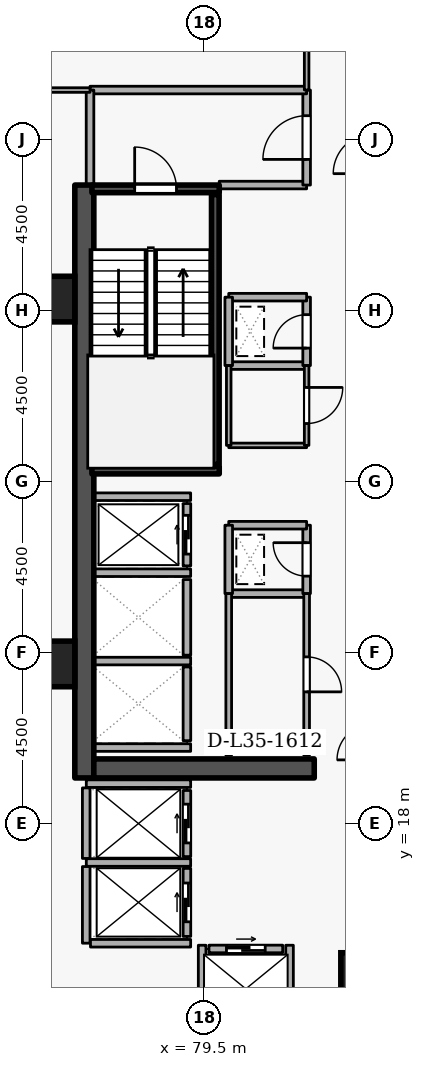
"""IFC4 building model, lengths in metres.
Left out: names, types, materials, properties, quantities, classifications, styles, units other than length and angle.
Written with IfcOpenShell. Run it as: python <this file> out.ifc"""

import sys

from ifc_helpers import new_model, si_unit, direction, frame, frame_2d, origin, origin_2d, place, context, subcontext, project, spatial, rectangle, extrude, element, fill, save


model = new_model("IFC4")
c1 = context("Model", 3, precision=1e-05, world=origin(), true_north=direction((0.0, 1.0)))
c2 = subcontext(c1, "Body", "Model", "MODEL_VIEW")
j1 = project(units=[si_unit("LENGTHUNIT", "METRE"), si_unit("PLANEANGLEUNIT", "RADIAN")], contexts=[c1])
p1 = place(None, origin())
s1 = spatial("IfcSite", under=j1, at=p1, CompositionType="ELEMENT")
p2 = place(p1, origin())
s2 = spatial("IfcBuilding", under=s1, at=p2, CompositionType="ELEMENT")
p3 = place(p2, frame((0.0, 0.0, 134.1)))
s3 = spatial("IfcBuildingStorey", under=s2, at=p3, CompositionType="ELEMENT", Elevation=134.1)
p4 = place(p3, frame((76.35, 19.2, 0.0), z_axis=(0.0, 0.0, 1.0), x_axis=(0.0, 1.0, 0.0)))
e1 = element("IfcWall", 1, at=p4, inside=s3, PredefinedType="SHEAR", context=c2, shape_type="SweptSolid", body=[
    extrude(rectangle(XDim=15.6, YDim=0.5, at=frame_2d((7.8, 0.0))), origin(), (0.0, 0.0, 1.0), 3.6),
])
p5 = place(p3, frame((76.6, 19.45, 0.0), z_axis=(0.0, 0.0, 1.0), x_axis=(1.0, 0.0, 0.0)))
e2 = element("IfcWall", 2, at=p5, inside=s3, PredefinedType="SHEAR", context=c2, shape_type="SweptSolid", body=[
    extrude(rectangle(XDim=5.8, YDim=0.5, at=frame_2d((2.9, 0.0))), origin(), (0.0, 0.0, 1.0), 3.6),
])
for number, where, z_axis, x_axis in (
    (3, (83.7, 14.0, 0.0), (0.0, 0.0, 1.0), (1.0, 0.0, 0.0)),
    (4, (75.5, 22.2, 0.0), (0.0, 0.0, 1.0), (1.0, 0.0, 0.0)),
    (5, (75.5, 31.8, 0.0), (0.0, 0.0, 1.0), (1.0, 0.0, 0.0)),
):
    element("IfcColumn", number, at=place(p3, frame(where, z_axis=z_axis, x_axis=x_axis)), inside=s3, PredefinedType="COLUMN", context=c2, shape_type="SweptSolid", body=[
        extrude(rectangle(XDim=1.2, YDim=1.2, at=origin_2d()), origin(), (0.0, 0.0, 1.0), 3.6),
    ])
p6 = place(p3, frame((79.05, 24.78, 0.0), z_axis=(0.0, 0.0, 1.0), x_axis=(0.0, 1.0, 0.0)))
e6 = element("IfcWall", 6, at=p6, inside=s3, PredefinedType="STANDARD", context=c2, shape_type="SweptSolid", body=[
    extrude(rectangle(XDim=1.64, YDim=0.2, at=frame_2d((0.82, 0.0))), origin(), (0.0, 0.0, 1.0), 3.34),
])
p7 = place(p6, frame((0.31, 0.0, 0.0)))
e7 = element("IfcOpeningElement", 7, at=p7, cuts=e6, PredefinedType="OPENING", context=c2, shape_type="SweptSolid", body=[
    extrude(rectangle(XDim=1.02, YDim=2.06, at=frame_2d((0.51, 1.03))), frame((0.0, 0.11, 0.0), z_axis=(0.0, -1.0, 0.0), x_axis=(1.0, 0.0, 0.0)), (0.0, 0.0, 1.0), 0.22),
])
p8 = place(p3, frame((79.05, 22.43, 0.0), z_axis=(0.0, 0.0, 1.0), x_axis=(0.0, 1.0, 0.0)))
e8 = element("IfcWall", 8, at=p8, inside=s3, PredefinedType="STANDARD", context=c2, shape_type="SweptSolid", body=[
    extrude(rectangle(XDim=1.99, YDim=0.2, at=frame_2d((0.995, 0.0))), origin(), (0.0, 0.0, 1.0), 3.34),
])
p9 = place(p3, frame((79.05, 20.18, 0.0), z_axis=(0.0, 0.0, 1.0), x_axis=(0.0, 1.0, 0.0)))
e9 = element("IfcWall", 9, at=p9, inside=s3, PredefinedType="STANDARD", context=c2, shape_type="SweptSolid", body=[
    extrude(rectangle(XDim=1.94, YDim=0.2, at=frame_2d((0.97, 0.0))), origin(), (0.0, 0.0, 1.0), 3.34),
])
p10 = place(p3, frame((79.05, 17.13, 0.0), z_axis=(0.0, 0.0, 1.0), x_axis=(0.0, 1.0, 0.0)))
e10 = element("IfcWall", 10, at=p10, inside=s3, PredefinedType="STANDARD", context=c2, shape_type="SweptSolid", body=[
    extrude(rectangle(XDim=1.74, YDim=0.2, at=frame_2d((0.87, 0.0))), origin(), (0.0, 0.0, 1.0), 3.34),
])
p11 = place(p10, frame((0.36, 0.0, 0.0)))
e11 = element("IfcOpeningElement", 11, at=p11, cuts=e10, PredefinedType="OPENING", context=c2, shape_type="SweptSolid", body=[
    extrude(rectangle(XDim=1.02, YDim=2.06, at=frame_2d((0.51, 1.03))), frame((0.0, 0.11, 0.0), z_axis=(0.0, -1.0, 0.0), x_axis=(1.0, 0.0, 0.0)), (0.0, 0.0, 1.0), 0.22),
])
p12 = place(p3, frame((79.05, 15.03, 0.0), z_axis=(0.0, 0.0, 1.0), x_axis=(0.0, 1.0, 0.0)))
e12 = element("IfcWall", 12, at=p12, inside=s3, PredefinedType="STANDARD", context=c2, shape_type="SweptSolid", body=[
    extrude(rectangle(XDim=1.79, YDim=0.2, at=frame_2d((0.895, 0.0))), origin(), (0.0, 0.0, 1.0), 3.34),
])
p13 = place(p12, frame((0.385, 0.0, 0.0)))
e13 = element("IfcOpeningElement", 13, at=p13, cuts=e12, PredefinedType="OPENING", context=c2, shape_type="SweptSolid", body=[
    extrude(rectangle(XDim=1.02, YDim=2.06, at=frame_2d((0.51, 1.03))), frame((0.0, 0.11, 0.0), z_axis=(0.0, -1.0, 0.0), x_axis=(1.0, 0.0, 0.0)), (0.0, 0.0, 1.0), 0.22),
])
p14 = place(p3, frame((79.63, 14.7, 0.0), z_axis=(0.0, 0.0, 1.0), x_axis=(1.0, 0.0, 0.0)))
e14 = element("IfcWall", 14, at=p14, inside=s3, PredefinedType="STANDARD", context=c2, shape_type="SweptSolid", body=[
    extrude(rectangle(XDim=1.94, YDim=0.2, at=frame_2d((0.97, 0.0))), origin(), (0.0, 0.0, 1.0), 3.34),
])
p15 = place(p14, frame((0.46, 0.0, 0.0)))
e15 = element("IfcOpeningElement", 15, at=p15, cuts=e14, PredefinedType="OPENING", context=c2, shape_type="SweptSolid", body=[
    extrude(rectangle(XDim=1.02, YDim=2.06, at=frame_2d((0.51, 1.03))), frame((0.0, 0.11, 0.0), z_axis=(0.0, -1.0, 0.0), x_axis=(1.0, 0.0, 0.0)), (0.0, 0.0, 1.0), 0.22),
])
for number, where, z_axis, x_axis in (
    (16, (76.612, 26.6, 0.0), (0.0, 0.0, 1.0), (1.0, 0.0, 0.0)),
    (17, (76.612, 24.6, 0.0), (0.0, 0.0, 1.0), (1.0, 0.0, 0.0)),
    (18, (76.612, 22.275, 0.0), (0.0, 0.0, 1.0), (1.0, 0.0, 0.0)),
    (19, (76.612, 20.0, 0.0), (0.0, 0.0, 1.0), (1.0, 0.0, 0.0)),
):
    element("IfcWall", number, at=place(p3, frame(where, z_axis=z_axis, x_axis=x_axis)), inside=s3, PredefinedType="STANDARD", context=c2, shape_type="SweptSolid", body=[
        extrude(rectangle(XDim=2.536, YDim=0.2, at=frame_2d((1.268, 0.0))), origin(), (0.0, 0.0, 1.0), 3.34),
    ])
p16 = place(p3, frame((76.402, 19.05, 0.0), z_axis=(0.0, 0.0, 1.0), x_axis=(1.0, 0.0, 0.0)))
e20 = element("IfcWall", 20, at=p16, inside=s3, PredefinedType="STANDARD", context=c2, shape_type="SweptSolid", body=[
    extrude(rectangle(XDim=2.746, YDim=0.2, at=frame_2d((1.373, 0.0))), origin(), (0.0, 0.0, 1.0), 2.545),
])
p17 = place(p3, frame((76.402, 16.975, 0.0), z_axis=(0.0, 0.0, 1.0), x_axis=(1.0, 0.0, 0.0)))
e21 = element("IfcWall", 21, at=p17, inside=s3, PredefinedType="STANDARD", context=c2, shape_type="SweptSolid", body=[
    extrude(rectangle(XDim=2.746, YDim=0.2, at=frame_2d((1.373, 0.0))), origin(), (0.0, 0.0, 1.0), 3.34),
])
p18 = place(p3, frame((76.4, 14.852, 0.0), z_axis=(0.0, 0.0, 1.0), x_axis=(0.0, 1.0, 0.0)))
e22 = element("IfcWall", 22, at=p18, inside=s3, PredefinedType="STANDARD", context=c2, shape_type="SweptSolid", body=[
    extrude(rectangle(XDim=2.016, YDim=0.2, at=frame_2d((1.008, 0.0))), origin(), (0.0, 0.0, 1.0), 3.34),
])
p19 = place(p3, frame((76.4, 17.082, 0.0), z_axis=(0.0, 0.0, 1.0), x_axis=(0.0, 1.0, 0.0)))
e23 = element("IfcWall", 23, at=p19, inside=s3, PredefinedType="STANDARD", context=c2, shape_type="SweptSolid", body=[
    extrude(rectangle(XDim=1.856, YDim=0.2, at=frame_2d((0.928, 0.0))), origin(), (0.0, 0.0, 1.0), 3.34),
])
p20 = place(p3, frame((76.512, 14.85, 0.0), z_axis=(0.0, 0.0, 1.0), x_axis=(1.0, 0.0, 0.0)))
e24 = element("IfcWall", 24, at=p20, inside=s3, PredefinedType="STANDARD", context=c2, shape_type="SweptSolid", body=[
    extrude(rectangle(XDim=2.636, YDim=0.2, at=frame_2d((1.318, 0.0))), origin(), (0.0, 0.0, 1.0), 3.34),
])
for number, where, z_axis, x_axis in (
    (25, (81.75, 12.612, 0.0), (0.0, 0.0, 1.0), (0.0, 1.0, 0.0)),
    (26, (79.45, 12.612, 0.0), (0.0, 0.0, 1.0), (0.0, 1.0, 0.0)),
):
    element("IfcWall", number, at=place(p3, frame(where, z_axis=z_axis, x_axis=x_axis)), inside=s3, PredefinedType="STANDARD", context=c2, shape_type="SweptSolid", body=[
        extrude(rectangle(XDim=2.186, YDim=0.2, at=frame_2d((1.093, 0.0))), origin(), (0.0, 0.0, 1.0), 3.34),
    ])
p21 = place(p3, frame((76.55, 34.7, 0.0), z_axis=(0.0, 0.0, 1.0), x_axis=(1.0, 0.0, 0.0)))
e27 = element("IfcWall", 27, at=p21, inside=s3, PredefinedType="SHEAR", context=c2, shape_type="SweptSolid", body=[
    extrude(rectangle(XDim=3.35, YDim=0.2, at=frame_2d((1.675, 0.0))), origin(), (0.0, 0.0, 1.0), 3.6),
])
p22 = place(p21, frame((1.125, 0.0, 0.0)))
e28 = element("IfcOpeningElement", 28, at=p22, cuts=e27, PredefinedType="OPENING", context=c2, shape_type="SweptSolid", body=[
    extrude(rectangle(XDim=1.1, YDim=2.1, at=frame_2d((0.55, 1.05))), frame((0.0, 0.11, 0.0), z_axis=(0.0, -1.0, 0.0), x_axis=(1.0, 0.0, 0.0)), (0.0, 0.0, 1.0), 0.22),
])
p23 = place(p3, frame((79.9, 27.3, 0.0), z_axis=(0.0, 0.0, 1.0), x_axis=(-1.0, 0.0, 0.0)))
e29 = element("IfcWall", 29, at=p23, inside=s3, PredefinedType="SHEAR", context=c2, shape_type="SweptSolid", body=[
    extrude(rectangle(XDim=3.35, YDim=0.2, at=frame_2d((1.675, 0.0))), origin(), (0.0, 0.0, 1.0), 3.6),
])
p24 = place(p3, frame((79.797, 27.45, 0.0), z_axis=(0.0, 0.0, 1.0), x_axis=(0.0, 1.0, 0.0)))
e30 = element("IfcWall", 30, at=p24, inside=s3, PredefinedType="SHEAR", context=c2, shape_type="SweptSolid", body=[
    extrude(rectangle(XDim=7.1, YDim=0.2, at=frame_2d((3.55, 0.0))), origin(), (0.0, 0.0, 1.0), 3.6),
])
p25 = place(p3, frame((79.9, 34.8, 0.0), z_axis=(0.0, 0.0, 1.0), x_axis=(1.0, 0.0, 0.0)))
e31 = element("IfcWall", 31, at=p25, inside=s3, PredefinedType="STANDARD", context=c2, shape_type="SweptSolid", body=[
    extrude(rectangle(XDim=2.3, YDim=0.2, at=frame_2d((1.15, 0.0))), origin(), (0.0, 0.0, 1.0), 2.545),
])
p26 = place(p3, frame((82.2, 34.8, 0.0), z_axis=(0.0, 0.0, 1.0), x_axis=(0.0, 1.0, 0.0)))
e32 = element("IfcWall", 32, at=p26, inside=s3, PredefinedType="STANDARD", context=c2, shape_type="SweptSolid", body=[
    extrude(rectangle(XDim=2.5, YDim=0.2, at=frame_2d((1.25, 0.0))), origin(), (0.0, 0.0, 1.0), 3.34),
])
p27 = place(p26, frame((0.675, 0.0, 0.0)))
e33 = element("IfcOpeningElement", 33, at=p27, cuts=e32, PredefinedType="OPENING", context=c2, shape_type="SweptSolid", body=[
    extrude(rectangle(XDim=1.15, YDim=2.1, at=frame_2d((0.575, 1.05))), frame((0.0, 0.11, 0.0), z_axis=(0.0, -1.0, 0.0), x_axis=(1.0, 0.0, 0.0)), (0.0, 0.0, 1.0), 0.22),
])
p28 = place(p3, frame((82.2, 37.3, 0.0), z_axis=(0.0, 0.0, 1.0), x_axis=(-1.0, 0.0, 0.0)))
e34 = element("IfcWall", 34, at=p28, inside=s3, PredefinedType="STANDARD", context=c2, shape_type="SweptSolid", body=[
    extrude(rectangle(XDim=5.7, YDim=0.2, at=frame_2d((2.85, 0.0))), origin(), (0.0, 0.0, 1.0), 3.34),
])
p29 = place(p3, frame((76.5, 37.3, 0.0), z_axis=(0.0, 0.0, 1.0), x_axis=(0.0, -1.0, 0.0)))
e35 = element("IfcWall", 35, at=p29, inside=s3, PredefinedType="STANDARD", context=c2, shape_type="SweptSolid", body=[
    extrude(rectangle(XDim=2.5, YDim=0.2, at=frame_2d((1.25, 0.0))), origin(), (0.0, 0.0, 1.0), 3.34),
])
p30 = place(p3, frame((80.15, 24.05, 0.0), z_axis=(0.0, 0.0, 1.0), x_axis=(1.0, 0.0, 0.0)))
e36 = element("IfcWall", 36, at=p30, inside=s3, PredefinedType="STANDARD", context=c2, shape_type="SweptSolid", body=[
    extrude(rectangle(XDim=2.05, YDim=0.2, at=frame_2d((1.025, 0.0))), origin(), (0.0, 0.0, 1.0), 3.34),
])
p31 = place(p3, frame((82.2, 24.05, 0.0), z_axis=(0.0, 0.0, 1.0), x_axis=(0.0, 1.0, 0.0)))
e37 = element("IfcWall", 37, at=p31, inside=s3, PredefinedType="STANDARD", context=c2, shape_type="SweptSolid", body=[
    extrude(rectangle(XDim=1.8, YDim=0.2, at=frame_2d((0.9, 0.0))), origin(), (0.0, 0.0, 1.0), 3.34),
])
p32 = place(p31, frame((0.46, 0.0, 0.0)))
e38 = element("IfcOpeningElement", 38, at=p32, cuts=e37, PredefinedType="OPENING", context=c2, shape_type="SweptSolid", body=[
    extrude(rectangle(XDim=0.88, YDim=2.04, at=frame_2d((0.44, 1.02))), frame((0.0, 0.11, 0.0), z_axis=(0.0, -1.0, 0.0), x_axis=(1.0, 0.0, 0.0)), (0.0, 0.0, 1.0), 0.22),
])
p33 = place(p3, frame((82.2, 25.85, 0.0), z_axis=(0.0, 0.0, 1.0), x_axis=(-1.0, 0.0, 0.0)))
e39 = element("IfcWall", 39, at=p33, inside=s3, PredefinedType="STANDARD", context=c2, shape_type="SweptSolid", body=[
    extrude(rectangle(XDim=2.05, YDim=0.2, at=frame_2d((1.025, 0.0))), origin(), (0.0, 0.0, 1.0), 3.34),
])
p34 = place(p3, frame((80.15, 25.85, 0.0), z_axis=(0.0, 0.0, 1.0), x_axis=(0.0, -1.0, 0.0)))
e40 = element("IfcWall", 40, at=p34, inside=s3, PredefinedType="STANDARD", context=c2, shape_type="SweptSolid", body=[
    extrude(rectangle(XDim=1.8, YDim=0.2, at=frame_2d((0.9, 0.0))), origin(), (0.0, 0.0, 1.0), 3.34),
])
p35 = place(p3, frame((80.15, 30.05, 0.0), z_axis=(0.0, 0.0, 1.0), x_axis=(1.0, 0.0, 0.0)))
e41 = element("IfcWall", 41, at=p35, inside=s3, PredefinedType="STANDARD", context=c2, shape_type="SweptSolid", body=[
    extrude(rectangle(XDim=2.05, YDim=0.2, at=frame_2d((1.025, 0.0))), origin(), (0.0, 0.0, 1.0), 3.34),
])
p36 = place(p3, frame((82.2, 30.05, 0.0), z_axis=(0.0, 0.0, 1.0), x_axis=(0.0, 1.0, 0.0)))
e42 = element("IfcWall", 42, at=p36, inside=s3, PredefinedType="STANDARD", context=c2, shape_type="SweptSolid", body=[
    extrude(rectangle(XDim=1.8, YDim=0.2, at=frame_2d((0.9, 0.0))), origin(), (0.0, 0.0, 1.0), 3.34),
])
p37 = place(p36, frame((0.46, 0.0, 0.0)))
e43 = element("IfcOpeningElement", 43, at=p37, cuts=e42, PredefinedType="OPENING", context=c2, shape_type="SweptSolid", body=[
    extrude(rectangle(XDim=0.88, YDim=2.04, at=frame_2d((0.44, 1.02))), frame((0.0, 0.11, 0.0), z_axis=(0.0, -1.0, 0.0), x_axis=(1.0, 0.0, 0.0)), (0.0, 0.0, 1.0), 0.22),
])
p38 = place(p3, frame((82.2, 31.85, 0.0), z_axis=(0.0, 0.0, 1.0), x_axis=(-1.0, 0.0, 0.0)))
e44 = element("IfcWall", 44, at=p38, inside=s3, PredefinedType="STANDARD", context=c2, shape_type="SweptSolid", body=[
    extrude(rectangle(XDim=2.05, YDim=0.2, at=frame_2d((1.025, 0.0))), origin(), (0.0, 0.0, 1.0), 3.34),
])
p39 = place(p3, frame((80.15, 31.85, 0.0), z_axis=(0.0, 0.0, 1.0), x_axis=(0.0, -1.0, 0.0)))
e45 = element("IfcWall", 45, at=p39, inside=s3, PredefinedType="STANDARD", context=c2, shape_type="SweptSolid", body=[
    extrude(rectangle(XDim=1.8, YDim=0.2, at=frame_2d((0.9, 0.0))), origin(), (0.0, 0.0, 1.0), 3.34),
])
p40 = place(p3, frame((80.15, 19.8, 0.0), z_axis=(0.0, 0.0, 1.0), x_axis=(0.0, 1.0, 0.0)))
e46 = element("IfcWall", 46, at=p40, inside=s3, PredefinedType="PARTITIONING", context=c2, shape_type="SweptSolid", body=[
    extrude(rectangle(XDim=4.25, YDim=0.15, at=frame_2d((2.125, 0.0))), origin(), (0.0, 0.0, 1.0), 3.34),
])
p41 = place(p3, frame((82.2, 24.05, 0.0), z_axis=(0.0, 0.0, 1.0), x_axis=(0.0, -1.0, 0.0)))
e47 = element("IfcWall", 47, at=p41, inside=s3, PredefinedType="PARTITIONING", context=c2, shape_type="SweptSolid", body=[
    extrude(rectangle(XDim=4.25, YDim=0.15, at=frame_2d((2.125, 0.0))), origin(), (0.0, 0.0, 1.0), 3.34),
])
p42 = place(p41, frame((1.665, 0.0, 0.0)))
e48 = element("IfcOpeningElement", 48, at=p42, cuts=e47, PredefinedType="OPENING", context=c2, shape_type="SweptSolid", body=[
    extrude(rectangle(XDim=0.92, YDim=2.08, at=frame_2d((0.46, 1.04))), frame((0.0, 0.085, 0.0), z_axis=(0.0, -1.0, 0.0), x_axis=(1.0, 0.0, 0.0)), (0.0, 0.0, 1.0), 0.17),
])
p43 = place(p3, frame((82.2, 27.95, 0.0), z_axis=(0.0, 0.0, 1.0), x_axis=(-1.0, 0.0, 0.0)))
e49 = element("IfcWall", 49, at=p43, inside=s3, PredefinedType="PARTITIONING", context=c2, shape_type="SweptSolid", body=[
    extrude(rectangle(XDim=2.05, YDim=0.12, at=frame_2d((1.025, 0.0))), origin(), (0.0, 0.0, 1.0), 3.34),
])
p44 = place(p3, frame((80.15, 27.95, 0.0), z_axis=(0.0, 0.0, 1.0), x_axis=(0.0, 1.0, 0.0)))
e50 = element("IfcWall", 50, at=p44, inside=s3, PredefinedType="PARTITIONING", context=c2, shape_type="SweptSolid", body=[
    extrude(rectangle(XDim=2.1, YDim=0.12, at=frame_2d((1.05, 0.0))), origin(), (0.0, 0.0, 1.0), 3.34),
])
p45 = place(p3, frame((82.2, 30.05, 0.0), z_axis=(0.0, 0.0, 1.0), x_axis=(0.0, -1.0, 0.0)))
e51 = element("IfcWall", 51, at=p45, inside=s3, PredefinedType="PARTITIONING", context=c2, shape_type="SweptSolid", body=[
    extrude(rectangle(XDim=2.1, YDim=0.12, at=frame_2d((1.05, 0.0))), origin(), (0.0, 0.0, 1.0), 3.34),
])
p46 = place(p45, frame((0.575, 0.0, 0.0)))
e52 = element("IfcOpeningElement", 52, at=p46, cuts=e51, PredefinedType="OPENING", context=c2, shape_type="SweptSolid", body=[
    extrude(rectangle(XDim=0.95, YDim=2.1, at=frame_2d((0.475, 1.05))), frame((0.0, 0.07, 0.0), z_axis=(0.0, -1.0, 0.0), x_axis=(1.0, 0.0, 0.0)), (0.0, 0.0, 1.0), 0.14),
])
p47 = place(p3, frame((82.2, 39.25, 0.0), z_axis=(0.0, 0.0, 1.0), x_axis=(0.0, -1.0, 0.0)))
e53 = element("IfcWall", 53, at=p47, inside=s3, PredefinedType="PARTITIONING", context=c2, shape_type="SweptSolid", body=[
    extrude(rectangle(XDim=1.95, YDim=0.12, at=frame_2d((0.975, 0.0))), origin(), (0.0, 0.0, 1.0), 3.34),
])
p48 = place(p3, frame((76.5, 37.3, 0.0), z_axis=(0.0, 0.0, 1.0), x_axis=(-1.0, 0.0, 0.0)))
e54 = element("IfcWall", 54, at=p48, inside=s3, PredefinedType="PARTITIONING", context=c2, shape_type="SweptSolid", body=[
    extrude(rectangle(XDim=5.72, YDim=0.12, at=frame_2d((2.86, 0.0))), origin(), (0.0, 0.0, 1.0), 3.34),
])
p49 = place(p7, origin())
e55 = element("IfcDoor", 55, at=p49, inside=s3, OperationType="SLIDING_TO_LEFT", PredefinedType="DOOR", context=c2, shape_type="SweptSolid", body=[
    extrude(rectangle(XDim=1.02, YDim=2.06, at=frame_2d((0.51, 1.03))), frame((0.0, 0.025, 0.0), z_axis=(0.0, -1.0, 0.0), x_axis=(1.0, 0.0, 0.0)), (0.0, 0.0, 1.0), 0.05),
])
fill(e7, e55)
p50 = place(p11, origin())
e56 = element("IfcDoor", 56, at=p50, inside=s3, OperationType="SLIDING_TO_LEFT", PredefinedType="DOOR", context=c2, shape_type="SweptSolid", body=[
    extrude(rectangle(XDim=1.02, YDim=2.06, at=frame_2d((0.51, 1.03))), frame((0.0, 0.025, 0.0), z_axis=(0.0, -1.0, 0.0), x_axis=(1.0, 0.0, 0.0)), (0.0, 0.0, 1.0), 0.05),
])
fill(e11, e56)
p51 = place(p13, origin())
e57 = element("IfcDoor", 57, at=p51, inside=s3, OperationType="SLIDING_TO_LEFT", PredefinedType="DOOR", context=c2, shape_type="SweptSolid", body=[
    extrude(rectangle(XDim=1.02, YDim=2.06, at=frame_2d((0.51, 1.03))), frame((0.0, 0.025, 0.0), z_axis=(0.0, -1.0, 0.0), x_axis=(1.0, 0.0, 0.0)), (0.0, 0.0, 1.0), 0.05),
])
fill(e13, e57)
p52 = place(p15, origin())
e58 = element("IfcDoor", 58, at=p52, inside=s3, OperationType="SLIDING_TO_LEFT", PredefinedType="DOOR", context=c2, shape_type="SweptSolid", body=[
    extrude(rectangle(XDim=1.02, YDim=2.06, at=frame_2d((0.51, 1.03))), frame((0.0, 0.025, 0.0), z_axis=(0.0, -1.0, 0.0), x_axis=(1.0, 0.0, 0.0)), (0.0, 0.0, 1.0), 0.05),
])
fill(e15, e58)
p53 = place(p22, origin())
e59 = element("IfcDoor", 59, at=p53, inside=s3, OperationType="SINGLE_SWING_LEFT", PredefinedType="DOOR", context=c2, shape_type="SweptSolid", body=[
    extrude(rectangle(XDim=1.1, YDim=2.1, at=frame_2d((0.55, 1.05))), frame((0.0, 0.025, 0.0), z_axis=(0.0, -1.0, 0.0), x_axis=(1.0, 0.0, 0.0)), (0.0, 0.0, 1.0), 0.05),
])
fill(e28, e59)
p54 = place(p27, origin())
e60 = element("IfcDoor", 60, at=p54, inside=s3, OperationType="SINGLE_SWING_LEFT", PredefinedType="DOOR", context=c2, shape_type="SweptSolid", body=[
    extrude(rectangle(XDim=1.15, YDim=2.1, at=frame_2d((0.575, 1.05))), frame((0.0, 0.025, 0.0), z_axis=(0.0, -1.0, 0.0), x_axis=(1.0, 0.0, 0.0)), (0.0, 0.0, 1.0), 0.05),
])
fill(e33, e60)
p55 = place(p32, origin())
e61 = element("IfcDoor", 61, at=p55, inside=s3, OperationType="SINGLE_SWING_RIGHT", PredefinedType="DOOR", context=c2, shape_type="SweptSolid", body=[
    extrude(rectangle(XDim=0.88, YDim=2.04, at=frame_2d((0.44, 1.02))), frame((0.0, 0.025, 0.0), z_axis=(0.0, -1.0, 0.0), x_axis=(1.0, 0.0, 0.0)), (0.0, 0.0, 1.0), 0.05),
])
fill(e38, e61)
p56 = place(p37, origin())
e62 = element("IfcDoor", 62, at=p56, inside=s3, OperationType="SINGLE_SWING_LEFT", PredefinedType="DOOR", context=c2, shape_type="SweptSolid", body=[
    extrude(rectangle(XDim=0.88, YDim=2.04, at=frame_2d((0.44, 1.02))), frame((0.0, 0.025, 0.0), z_axis=(0.0, -1.0, 0.0), x_axis=(1.0, 0.0, 0.0)), (0.0, 0.0, 1.0), 0.05),
])
fill(e43, e62)
p57 = place(p42, origin())
e63 = element("IfcDoor", 63, at=p57, inside=s3, OperationType="SINGLE_SWING_RIGHT", PredefinedType="DOOR", context=c2, shape_type="SweptSolid", body=[
    extrude(rectangle(XDim=0.92, YDim=2.08, at=frame_2d((0.46, 1.04))), frame((0.0, 0.025, 0.0), z_axis=(0.0, -1.0, 0.0), x_axis=(1.0, 0.0, 0.0)), (0.0, 0.0, 1.0), 0.05),
])
fill(e48, e63)
p58 = place(p46, origin())
e64 = element("IfcDoor", 64, at=p58, inside=s3, OperationType="SINGLE_SWING_LEFT", PredefinedType="DOOR", context=c2, shape_type="SweptSolid", body=[
    extrude(rectangle(XDim=0.95, YDim=2.1, at=frame_2d((0.475, 1.05))), frame((0.0, 0.025, 0.0), z_axis=(0.0, -1.0, 0.0), x_axis=(1.0, 0.0, 0.0)), (0.0, 0.0, 1.0), 0.05),
])
fill(e52, e64)
save(model, sys.argv[1])
